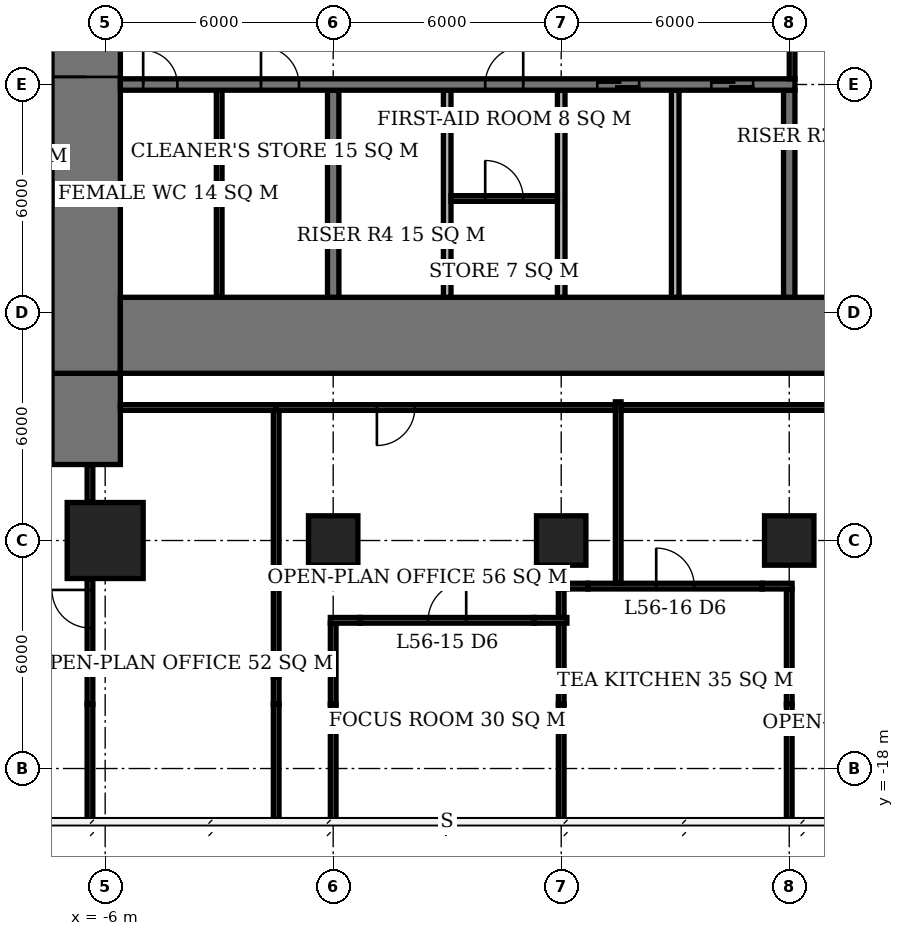
"""IFC4 building model, lengths in metres.
Left out: names, types, materials, properties, quantities, classifications, styles, units other than length and angle.
Written with IfcOpenShell. Run it as: python <this file> out.ifc"""

import sys

from ifc_helpers import new_model, si_unit, direction, frame, frame_2d, origin, origin_2d, place, context, subcontext, project, spatial, rectangle, extrude, element, fill, save


model = new_model("IFC4")
c1 = context("Model", 3, precision=1e-05, world=origin(), true_north=direction((0.0, 1.0)))
c2 = subcontext(c1, "Body", "Model", "MODEL_VIEW")
j1 = project(units=[si_unit("LENGTHUNIT", "METRE"), si_unit("PLANEANGLEUNIT", "RADIAN")], contexts=[c1])
p1 = place(None, origin())
s1 = spatial("IfcSite", under=j1, at=p1, CompositionType="ELEMENT")
p2 = place(p1, origin())
s2 = spatial("IfcBuilding", under=s1, at=p2, CompositionType="ELEMENT")
p3 = place(p2, frame((0.0, 0.0, 227.9)))
s3 = spatial("IfcBuildingStorey", under=s2, at=p3, CompositionType="ELEMENT", Elevation=227.9)
p4 = place(p3, frame((-6.0, -12.0, 0.0), z_axis=(0.0, 0.0, 1.0), x_axis=(1.0, 0.0, 0.0)))
e1 = element("IfcColumn", 1, at=p4, inside=s3, PredefinedType="COLUMN", context=c2, shape_type="SweptSolid", body=[
    extrude(rectangle(XDim=2.0, YDim=2.0, at=origin_2d()), origin(), (0.0, 0.0, 1.0), 3.9),
])
for number, where, z_axis, x_axis in (
    (2, (0.0, -12.0, 0.0), (0.0, 0.0, 1.0), (1.0, 0.0, 0.0)),
    (3, (6.0, -12.0, 0.0), (0.0, 0.0, 1.0), (1.0, 0.0, 0.0)),
    (4, (12.0, -12.0, 0.0), (0.0, 0.0, 1.0), (1.0, 0.0, 0.0)),
):
    element("IfcColumn", number, at=place(p3, frame(where, z_axis=z_axis, x_axis=x_axis)), inside=s3, PredefinedType="COLUMN", context=c2, shape_type="SweptSolid", body=[
        extrude(rectangle(XDim=1.3, YDim=1.3, at=origin_2d()), origin(), (0.0, 0.0, 1.0), 3.9),
    ])
p5 = place(p3, frame((-5.6, -6.6, 0.0), z_axis=(0.0, 0.0, 1.0), x_axis=(1.0, 0.0, 0.0)))
e5 = element("IfcWall", 5, at=p5, inside=s3, PredefinedType="SHEAR", context=c2, shape_type="SweptSolid", body=[
    extrude(rectangle(XDim=23.2, YDim=2.0, at=frame_2d((11.6, 0.0))), origin(), (0.0, 0.0, 1.0), 3.9),
])
p6 = place(p3, frame((-6.5, -7.6, 0.0), z_axis=(0.0, 0.0, 1.0), x_axis=(0.0, 1.0, 0.0)))
e6 = element("IfcWall", 6, at=p6, inside=s3, PredefinedType="SHEAR", context=c2, shape_type="SweptSolid", body=[
    extrude(rectangle(XDim=21.2, YDim=1.8, at=frame_2d((10.6, 0.0))), origin(), (0.0, 0.0, 1.0), 3.9),
])
p7 = place(p6, frame((7.8, 0.0, 0.0)))
e7 = element("IfcOpeningElement", 7, at=p7, cuts=e6, PredefinedType="OPENING", context=c2, shape_type="SweptSolid", body=[
    extrude(rectangle(XDim=1.8, YDim=2.4, at=frame_2d((0.9, 1.2))), frame((0.0, 0.91, 0.0), z_axis=(0.0, -1.0, 0.0), x_axis=(1.0, 0.0, 0.0)), (0.0, 0.0, 1.0), 1.82),
])
p8 = place(p3, frame((-6.5, -10.0, 0.0), z_axis=(0.0, 0.0, 1.0), x_axis=(0.0, 1.0, 0.0)))
e8 = element("IfcWall", 8, at=p8, inside=s3, PredefinedType="SHEAR", context=c2, shape_type="SweptSolid", body=[
    extrude(rectangle(XDim=2.4, YDim=1.8, at=frame_2d((1.2, 0.0))), origin(), (0.0, 0.0, 1.0), 3.9),
])
p9 = place(p3, frame((-5.6, 0.0, 0.0), z_axis=(0.0, 0.0, 1.0), x_axis=(1.0, 0.0, 0.0)))
e9 = element("IfcWall", 9, at=p9, inside=s3, PredefinedType="SHEAR", context=c2, shape_type="SweptSolid", body=[
    extrude(rectangle(XDim=17.75, YDim=0.3, at=frame_2d((8.875, 0.0))), origin(), (0.0, 0.0, 1.0), 3.9),
])
p10 = place(p9, frame((0.6, 0.0, 0.0)))
e10 = element("IfcOpeningElement", 10, at=p10, cuts=e9, PredefinedType="OPENING", context=c2, shape_type="SweptSolid", body=[
    extrude(rectangle(XDim=0.9, YDim=2.1, at=frame_2d((0.45, 1.05))), frame((0.0, 0.16, 0.0), z_axis=(0.0, -1.0, 0.0), x_axis=(1.0, 0.0, 0.0)), (0.0, 0.0, 1.0), 0.32),
])
p11 = place(p9, frame((3.7, 0.0, 0.0)))
e11 = element("IfcOpeningElement", 11, at=p11, cuts=e9, PredefinedType="OPENING", context=c2, shape_type="SweptSolid", body=[
    extrude(rectangle(XDim=1.0, YDim=2.1, at=frame_2d((0.5, 1.05))), frame((0.0, 0.16, 0.0), z_axis=(0.0, -1.0, 0.0), x_axis=(1.0, 0.0, 0.0)), (0.0, 0.0, 1.0), 0.32),
])
p12 = place(p9, frame((9.6, 0.0, 0.0)))
e12 = element("IfcOpeningElement", 12, at=p12, cuts=e9, PredefinedType="OPENING", context=c2, shape_type="SweptSolid", body=[
    extrude(rectangle(XDim=1.0, YDim=2.1, at=frame_2d((0.5, 1.05))), frame((0.0, 0.16, 0.0), z_axis=(0.0, -1.0, 0.0), x_axis=(1.0, 0.0, 0.0)), (0.0, 0.0, 1.0), 0.32),
])
p13 = place(p9, frame((12.55, 0.0, 0.0)))
e13 = element("IfcOpeningElement", 13, at=p13, cuts=e9, PredefinedType="OPENING", context=c2, shape_type="SweptSolid", body=[
    extrude(rectangle(XDim=1.1, YDim=2.1, at=frame_2d((0.55, 1.05))), frame((0.0, 0.16, 0.0), z_axis=(0.0, -1.0, 0.0), x_axis=(1.0, 0.0, 0.0)), (0.0, 0.0, 1.0), 0.32),
])
p14 = place(p9, frame((15.55, 0.0, 0.0)))
e14 = element("IfcOpeningElement", 14, at=p14, cuts=e9, PredefinedType="OPENING", context=c2, shape_type="SweptSolid", body=[
    extrude(rectangle(XDim=1.1, YDim=2.1, at=frame_2d((0.55, 1.05))), frame((0.0, 0.16, 0.0), z_axis=(0.0, -1.0, 0.0), x_axis=(1.0, 0.0, 0.0)), (0.0, 0.0, 1.0), 0.32),
])
for number, where, z_axis, x_axis in (
    (15, (0.0, -5.6, 0.0), (0.0, 0.0, 1.0), (0.0, 1.0, 0.0)),
    (16, (12.0, -5.6, 0.0), (0.0, 0.0, 1.0), (0.0, 1.0, 0.0)),
):
    element("IfcWall", number, at=place(p3, frame(where, z_axis=z_axis, x_axis=x_axis)), inside=s3, PredefinedType="SHEAR", context=c2, shape_type="SweptSolid", body=[
        extrude(rectangle(XDim=5.45, YDim=0.3, at=frame_2d((2.725, 0.0))), origin(), (0.0, 0.0, 1.0), 3.9),
    ])
for number, where, z_axis, x_axis in (
    (17, (3.0, -5.6, 0.0), (0.0, 0.0, 1.0), (0.0, 1.0, 0.0)),
    (18, (6.0, -5.6, 0.0), (0.0, 0.0, 1.0), (0.0, 1.0, 0.0)),
    (19, (9.0, -5.6, 0.0), (0.0, 0.0, 1.0), (0.0, 1.0, 0.0)),
):
    element("IfcWall", number, at=place(p3, frame(where, z_axis=z_axis, x_axis=x_axis)), inside=s3, PredefinedType="SOLIDWALL", context=c2, shape_type="SweptSolid", body=[
        extrude(rectangle(XDim=5.45, YDim=0.2, at=frame_2d((2.725, 0.0))), origin(), (0.0, 0.0, 1.0), 3.9),
    ])
p15 = place(p3, frame((-3.0, -5.6, 0.0), z_axis=(0.0, 0.0, 1.0), x_axis=(0.0, 1.0, 0.0)))
e20 = element("IfcWall", 20, at=p15, inside=s3, PredefinedType="PLUMBINGWALL", context=c2, shape_type="SweptSolid", body=[
    extrude(rectangle(XDim=5.45, YDim=0.15, at=frame_2d((2.725, 0.0))), origin(), (0.0, 0.0, 1.0), 3.65),
])
p16 = place(p3, frame((3.1, -3.0, 0.0), z_axis=(0.0, 0.0, 1.0), x_axis=(1.0, 0.0, 0.0)))
e21 = element("IfcWall", 21, at=p16, inside=s3, PredefinedType="PARTITIONING", context=c2, shape_type="SweptSolid", body=[
    extrude(rectangle(XDim=2.8, YDim=0.15, at=frame_2d((1.4, 0.0))), origin(), (0.0, 0.0, 1.0), 3.65),
])
p17 = place(p16, frame((0.9, 0.0, 0.0)))
e22 = element("IfcOpeningElement", 22, at=p17, cuts=e21, PredefinedType="OPENING", context=c2, shape_type="SweptSolid", body=[
    extrude(rectangle(XDim=1.0, YDim=2.1, at=frame_2d((0.5, 1.05))), frame((0.0, 0.085, 0.0), z_axis=(0.0, -1.0, 0.0), x_axis=(1.0, 0.0, 0.0)), (0.0, 0.0, 1.0), 0.17),
])
p18 = place(p3, frame((-0.075, -14.1, 0.0), z_axis=(0.0, 0.0, 1.0), x_axis=(1.0, 0.0, 0.0)))
e23 = element("IfcWall", 23, at=p18, inside=s3, PredefinedType="PARTITIONING", context=c2, shape_type="SweptSolid", body=[
    extrude(rectangle(XDim=0.785, YDim=0.15, at=frame_2d((0.393, 0.0))), origin(), (0.0, 0.0, 1.0), 2.65),
])
p19 = place(p3, frame((0.71, -14.1, 0.0), z_axis=(0.0, 0.0, 1.0), x_axis=(1.0, 0.0, 0.0)))
e24 = element("IfcWall", 24, at=p19, inside=s3, PredefinedType="PARTITIONING", context=c2, shape_type="SweptSolid", body=[
    extrude(rectangle(XDim=4.58, YDim=0.15, at=frame_2d((2.29, 0.0))), origin(), (0.0, 0.0, 1.0), 3.65),
])
p20 = place(p19, frame((1.79, 0.0, 0.0)))
e25 = element("IfcOpeningElement", 25, at=p20, cuts=e24, PredefinedType="OPENING", context=c2, shape_type="SweptSolid", body=[
    extrude(rectangle(XDim=1.0, YDim=2.1, at=frame_2d((0.5, 1.05))), frame((0.0, 0.085, 0.0), z_axis=(0.0, -1.0, 0.0), x_axis=(1.0, 0.0, 0.0)), (0.0, 0.0, 1.0), 0.17),
])
p21 = place(p3, frame((5.29, -14.1, 0.0), z_axis=(0.0, 0.0, 1.0), x_axis=(1.0, 0.0, 0.0)))
e26 = element("IfcWall", 26, at=p21, inside=s3, PredefinedType="PARTITIONING", context=c2, shape_type="SweptSolid", body=[
    extrude(rectangle(XDim=0.86, YDim=0.15, at=frame_2d((0.43, 0.0))), origin(), (0.0, 0.0, 1.0), 2.65),
])
p22 = place(p3, frame((5.925, -13.2, 0.0), z_axis=(0.0, 0.0, 1.0), x_axis=(1.0, 0.0, 0.0)))
e27 = element("IfcWall", 27, at=p22, inside=s3, PredefinedType="PARTITIONING", context=c2, shape_type="SweptSolid", body=[
    extrude(rectangle(XDim=0.785, YDim=0.15, at=frame_2d((0.393, 0.0))), origin(), (0.0, 0.0, 1.0), 2.65),
])
p23 = place(p3, frame((6.71, -13.2, 0.0), z_axis=(0.0, 0.0, 1.0), x_axis=(1.0, 0.0, 0.0)))
e28 = element("IfcWall", 28, at=p23, inside=s3, PredefinedType="PARTITIONING", context=c2, shape_type="SweptSolid", body=[
    extrude(rectangle(XDim=4.58, YDim=0.15, at=frame_2d((2.29, 0.0))), origin(), (0.0, 0.0, 1.0), 3.65),
])
p24 = place(p23, frame((1.79, 0.0, 0.0)))
e29 = element("IfcOpeningElement", 29, at=p24, cuts=e28, PredefinedType="OPENING", context=c2, shape_type="SweptSolid", body=[
    extrude(rectangle(XDim=1.0, YDim=2.1, at=frame_2d((0.5, 1.05))), frame((0.0, 0.085, 0.0), z_axis=(0.0, -1.0, 0.0), x_axis=(1.0, 0.0, 0.0)), (0.0, 0.0, 1.0), 0.17),
])
p25 = place(p3, frame((11.29, -13.2, 0.0), z_axis=(0.0, 0.0, 1.0), x_axis=(1.0, 0.0, 0.0)))
e30 = element("IfcWall", 30, at=p25, inside=s3, PredefinedType="PARTITIONING", context=c2, shape_type="SweptSolid", body=[
    extrude(rectangle(XDim=0.785, YDim=0.15, at=frame_2d((0.393, 0.0))), origin(), (0.0, 0.0, 1.0), 2.65),
])
p26 = place(p3, frame((0.0, -19.35, 0.0), z_axis=(0.0, 0.0, 1.0), x_axis=(0.0, 1.0, 0.0)))
e31 = element("IfcWall", 31, at=p26, inside=s3, PredefinedType="PARTITIONING", context=c2, shape_type="SweptSolid", body=[
    extrude(rectangle(XDim=3.04, YDim=0.15, at=frame_2d((1.52, 0.0))), origin(), (0.0, 0.0, 1.0), 3.65),
])
p27 = place(p3, frame((0.0, -16.31, 0.0), z_axis=(0.0, 0.0, 1.0), x_axis=(0.0, 1.0, 0.0)))
e32 = element("IfcWall", 32, at=p27, inside=s3, PredefinedType="PARTITIONING", context=c2, shape_type="SweptSolid", body=[
    extrude(rectangle(XDim=2.135, YDim=0.15, at=frame_2d((1.067, 0.0))), origin(), (0.0, 0.0, 1.0), 2.65),
])
p28 = place(p3, frame((6.0, -19.35, 0.0), z_axis=(0.0, 0.0, 1.0), x_axis=(0.0, 1.0, 0.0)))
e33 = element("IfcWall", 33, at=p28, inside=s3, PredefinedType="PARTITIONING", context=c2, shape_type="SweptSolid", body=[
    extrude(rectangle(XDim=3.04, YDim=0.15, at=frame_2d((1.52, 0.0))), origin(), (0.0, 0.0, 1.0), 3.65),
])
p29 = place(p3, frame((6.0, -16.31, 0.0), z_axis=(0.0, 0.0, 1.0), x_axis=(0.0, 1.0, 0.0)))
e34 = element("IfcWall", 34, at=p29, inside=s3, PredefinedType="PARTITIONING", context=c2, shape_type="SweptSolid", body=[
    extrude(rectangle(XDim=2.135, YDim=0.15, at=frame_2d((1.067, 0.0))), origin(), (0.0, 0.0, 1.0), 2.65),
])
p30 = place(p3, frame((6.0, -14.025, 0.0), z_axis=(0.0, 0.0, 1.0), x_axis=(0.0, 1.0, 0.0)))
e35 = element("IfcWall", 35, at=p30, inside=s3, PredefinedType="PARTITIONING", context=c2, shape_type="SweptSolid", body=[
    extrude(rectangle(XDim=0.75, YDim=0.15, at=frame_2d((0.375, 0.0))), origin(), (0.0, 0.0, 1.0), 2.65),
])
p31 = place(p3, frame((12.0, -19.4, 0.0), z_axis=(0.0, 0.0, 1.0), x_axis=(0.0, 1.0, 0.0)))
e36 = element("IfcWall", 36, at=p31, inside=s3, PredefinedType="PARTITIONING", context=c2, shape_type="SweptSolid", body=[
    extrude(rectangle(XDim=3.09, YDim=0.15, at=frame_2d((1.545, 0.0))), origin(), (0.0, 0.0, 1.0), 3.65),
])
p32 = place(p3, frame((12.0, -16.31, 0.0), z_axis=(0.0, 0.0, 1.0), x_axis=(0.0, 1.0, 0.0)))
e37 = element("IfcWall", 37, at=p32, inside=s3, PredefinedType="PARTITIONING", context=c2, shape_type="SweptSolid", body=[
    extrude(rectangle(XDim=3.035, YDim=0.15, at=frame_2d((1.518, 0.0))), origin(), (0.0, 0.0, 1.0), 2.65),
])
p33 = place(p3, frame((-6.4, -19.35, 0.0), z_axis=(0.0, 0.0, 1.0), x_axis=(0.0, 1.0, 0.0)))
e38 = element("IfcWall", 38, at=p33, inside=s3, PredefinedType="PARTITIONING", context=c2, shape_type="SweptSolid", body=[
    extrude(rectangle(XDim=3.04, YDim=0.15, at=frame_2d((1.52, 0.0))), origin(), (0.0, 0.0, 1.0), 3.65),
])
p34 = place(p3, frame((-6.4, -16.31, 0.0), z_axis=(0.0, 0.0, 1.0), x_axis=(0.0, 1.0, 0.0)))
e39 = element("IfcWall", 39, at=p34, inside=s3, PredefinedType="PARTITIONING", context=c2, shape_type="SweptSolid", body=[
    extrude(rectangle(XDim=3.31, YDim=0.15, at=frame_2d((1.655, 0.0))), origin(), (0.0, 0.0, 1.0), 2.65),
])
p35 = place(p34, frame((2.01, 0.0, 0.0)))
e40 = element("IfcOpeningElement", 40, at=p35, cuts=e39, PredefinedType="OPENING", context=c2, shape_type="SweptSolid", body=[
    extrude(rectangle(XDim=1.0, YDim=2.1, at=frame_2d((0.5, 1.05))), frame((0.0, 0.085, 0.0), z_axis=(0.0, -1.0, 0.0), x_axis=(1.0, 0.0, 0.0)), (0.0, 0.0, 1.0), 0.17),
])
p36 = place(p3, frame((-6.4, -11.0, 0.0), z_axis=(0.0, 0.0, 1.0), x_axis=(0.0, 1.0, 0.0)))
e41 = element("IfcWall", 41, at=p36, inside=s3, PredefinedType="PARTITIONING", context=c2, shape_type="SweptSolid", body=[
    extrude(rectangle(XDim=1.0, YDim=0.15, at=frame_2d((0.5, 0.0))), origin(), (0.0, 0.0, 1.0), 3.65),
])
p37 = place(p3, frame((-5.6, -8.5, 0.0), z_axis=(0.0, 0.0, 1.0), x_axis=(1.0, 0.0, 0.0)))
e42 = element("IfcWall", 42, at=p37, inside=s3, PredefinedType="PARTITIONING", context=c2, shape_type="SweptSolid", body=[
    extrude(rectangle(XDim=4.1, YDim=0.15, at=frame_2d((2.05, 0.0))), origin(), (0.0, 0.0, 1.0), 3.65),
])
p38 = place(p3, frame((-1.5, -19.4, 0.0), z_axis=(0.0, 0.0, 1.0), x_axis=(0.0, 1.0, 0.0)))
e43 = element("IfcWall", 43, at=p38, inside=s3, PredefinedType="PARTITIONING", context=c2, shape_type="SweptSolid", body=[
    extrude(rectangle(XDim=3.09, YDim=0.15, at=frame_2d((1.545, 0.0))), origin(), (0.0, 0.0, 1.0), 3.65),
])
p39 = place(p3, frame((-1.5, -16.31, 0.0), z_axis=(0.0, 0.0, 1.0), x_axis=(0.0, 1.0, 0.0)))
e44 = element("IfcWall", 44, at=p39, inside=s3, PredefinedType="PARTITIONING", context=c2, shape_type="SweptSolid", body=[
    extrude(rectangle(XDim=0.72, YDim=0.15, at=frame_2d((0.36, 0.0))), origin(), (0.0, 0.0, 1.0), 2.65),
])
p40 = place(p3, frame((-1.5, -15.59, 0.0), z_axis=(0.0, 0.0, 1.0), x_axis=(0.0, 1.0, 0.0)))
e45 = element("IfcWall", 45, at=p40, inside=s3, PredefinedType="PARTITIONING", context=c2, shape_type="SweptSolid", body=[
    extrude(rectangle(XDim=7.015, YDim=0.15, at=frame_2d((3.508, 0.0))), origin(), (0.0, 0.0, 1.0), 3.65),
])
p41 = place(p3, frame((7.425, -8.5, 0.0), z_axis=(0.0, 0.0, 1.0), x_axis=(-1.0, 0.0, 0.0)))
e46 = element("IfcWall", 46, at=p41, inside=s3, PredefinedType="PARTITIONING", context=c2, shape_type="SweptSolid", body=[
    extrude(rectangle(XDim=8.925, YDim=0.15, at=frame_2d((4.462, 0.0))), origin(), (0.0, 0.0, 1.0), 3.65),
])
p42 = place(p41, frame((5.275, 0.0, 0.0)))
e47 = element("IfcOpeningElement", 47, at=p42, cuts=e46, PredefinedType="OPENING", context=c2, shape_type="SweptSolid", body=[
    extrude(rectangle(XDim=1.0, YDim=2.1, at=frame_2d((0.5, 1.05))), frame((0.0, 0.085, 0.0), z_axis=(0.0, -1.0, 0.0), x_axis=(1.0, 0.0, 0.0)), (0.0, 0.0, 1.0), 0.17),
])
p43 = place(p3, frame((7.5, -13.125, 0.0), z_axis=(0.0, 0.0, 1.0), x_axis=(0.0, 1.0, 0.0)))
e48 = element("IfcWall", 48, at=p43, inside=s3, PredefinedType="PARTITIONING", context=c2, shape_type="SweptSolid", body=[
    extrude(rectangle(XDim=4.775, YDim=0.15, at=frame_2d((2.387, 0.0))), origin(), (0.0, 0.0, 1.0), 3.65),
])
p44 = place(p3, frame((7.575, -8.5, 0.0), z_axis=(0.0, 0.0, 1.0), x_axis=(1.0, 0.0, 0.0)))
e49 = element("IfcWall", 49, at=p44, inside=s3, PredefinedType="PARTITIONING", context=c2, shape_type="SweptSolid", body=[
    extrude(rectangle(XDim=10.025, YDim=0.15, at=frame_2d((5.013, 0.0))), origin(), (0.0, 0.0, 1.0), 3.65),
])
p45 = place(p3, frame((12.075, 0.15, 0.0), z_axis=(0.0, 0.0, 1.0), x_axis=(0.0, 1.0, 0.0)))
e50 = element("IfcWall", 50, at=p45, inside=s3, PredefinedType="PARTITIONING", context=c2, shape_type="SweptSolid", body=[
    extrude(rectangle(XDim=3.0, YDim=0.15, at=frame_2d((1.5, 0.0))), origin(), (0.0, 0.0, 1.0), 3.65),
])
p46 = place(p7, origin())
e51 = element("IfcDoor", 51, at=p46, inside=s3, OperationType="DOUBLE_DOOR_SINGLE_SWING", PredefinedType="DOOR", context=c2, shape_type="SweptSolid", body=[
    extrude(rectangle(XDim=1.8, YDim=2.4, at=frame_2d((0.9, 1.2))), frame((0.0, 0.025, 0.0), z_axis=(0.0, -1.0, 0.0), x_axis=(1.0, 0.0, 0.0)), (0.0, 0.0, 1.0), 0.05),
])
fill(e7, e51)
p47 = place(p10, origin())
e52 = element("IfcDoor", 52, at=p47, inside=s3, OperationType="SINGLE_SWING_LEFT", PredefinedType="DOOR", context=c2, shape_type="SweptSolid", body=[
    extrude(rectangle(XDim=0.9, YDim=2.1, at=frame_2d((0.45, 1.05))), frame((0.0, 0.025, 0.0), z_axis=(0.0, -1.0, 0.0), x_axis=(1.0, 0.0, 0.0)), (0.0, 0.0, 1.0), 0.05),
])
fill(e10, e52)
p48 = place(p11, origin())
e53 = element("IfcDoor", 53, at=p48, inside=s3, OperationType="SINGLE_SWING_LEFT", PredefinedType="DOOR", context=c2, shape_type="SweptSolid", body=[
    extrude(rectangle(XDim=1.0, YDim=2.1, at=frame_2d((0.5, 1.05))), frame((0.0, 0.025, 0.0), z_axis=(0.0, -1.0, 0.0), x_axis=(1.0, 0.0, 0.0)), (0.0, 0.0, 1.0), 0.05),
])
fill(e11, e53)
p49 = place(p17, origin())
e54 = element("IfcDoor", 54, at=p49, inside=s3, OperationType="SINGLE_SWING_LEFT", PredefinedType="DOOR", context=c2, shape_type="SweptSolid", body=[
    extrude(rectangle(XDim=1.0, YDim=2.1, at=frame_2d((0.5, 1.05))), frame((0.0, 0.025, 0.0), z_axis=(0.0, -1.0, 0.0), x_axis=(1.0, 0.0, 0.0)), (0.0, 0.0, 1.0), 0.05),
])
fill(e22, e54)
p50 = place(p12, origin())
e55 = element("IfcDoor", 55, at=p50, inside=s3, OperationType="SINGLE_SWING_RIGHT", PredefinedType="DOOR", context=c2, shape_type="SweptSolid", body=[
    extrude(rectangle(XDim=1.0, YDim=2.1, at=frame_2d((0.5, 1.05))), frame((0.0, 0.025, 0.0), z_axis=(0.0, -1.0, 0.0), x_axis=(1.0, 0.0, 0.0)), (0.0, 0.0, 1.0), 0.05),
])
fill(e12, e55)
p51 = place(p13, origin())
e56 = element("IfcDoor", 56, at=p51, inside=s3, OperationType="DOUBLE_DOOR_SLIDING", PredefinedType="USERDEFINED", context=c2, shape_type="SweptSolid", body=[
    extrude(rectangle(XDim=1.1, YDim=2.1, at=frame_2d((0.55, 1.05))), frame((0.0, 0.025, 0.0), z_axis=(0.0, -1.0, 0.0), x_axis=(1.0, 0.0, 0.0)), (0.0, 0.0, 1.0), 0.05),
])
fill(e13, e56)
p52 = place(p14, origin())
e57 = element("IfcDoor", 57, at=p52, inside=s3, OperationType="DOUBLE_DOOR_SLIDING", PredefinedType="USERDEFINED", context=c2, shape_type="SweptSolid", body=[
    extrude(rectangle(XDim=1.1, YDim=2.1, at=frame_2d((0.55, 1.05))), frame((0.0, 0.025, 0.0), z_axis=(0.0, -1.0, 0.0), x_axis=(1.0, 0.0, 0.0)), (0.0, 0.0, 1.0), 0.05),
])
fill(e14, e57)
p53 = place(p20, origin())
e58 = element("IfcDoor", 58, at=p53, inside=s3, OperationType="SINGLE_SWING_RIGHT", PredefinedType="DOOR", context=c2, shape_type="SweptSolid", body=[
    extrude(rectangle(XDim=1.0, YDim=2.1, at=frame_2d((0.5, 1.05))), frame((0.0, 0.025, 0.0), z_axis=(0.0, -1.0, 0.0), x_axis=(1.0, 0.0, 0.0)), (0.0, 0.0, 1.0), 0.05),
])
fill(e25, e58)
p54 = place(p24, origin())
e59 = element("IfcDoor", 59, at=p54, inside=s3, OperationType="SINGLE_SWING_LEFT", PredefinedType="DOOR", context=c2, shape_type="SweptSolid", body=[
    extrude(rectangle(XDim=1.0, YDim=2.1, at=frame_2d((0.5, 1.05))), frame((0.0, 0.025, 0.0), z_axis=(0.0, -1.0, 0.0), x_axis=(1.0, 0.0, 0.0)), (0.0, 0.0, 1.0), 0.05),
])
fill(e29, e59)
p55 = place(p35, origin())
e60 = element("IfcDoor", 60, at=p55, inside=s3, OperationType="SINGLE_SWING_RIGHT", PredefinedType="DOOR", context=c2, shape_type="SweptSolid", body=[
    extrude(rectangle(XDim=1.0, YDim=2.1, at=frame_2d((0.5, 1.05))), frame((0.0, 0.025, 0.0), z_axis=(0.0, -1.0, 0.0), x_axis=(1.0, 0.0, 0.0)), (0.0, 0.0, 1.0), 0.05),
])
fill(e40, e60)
p56 = place(p42, origin())
e61 = element("IfcDoor", 61, at=p56, inside=s3, OperationType="SINGLE_SWING_RIGHT", PredefinedType="DOOR", context=c2, shape_type="SweptSolid", body=[
    extrude(rectangle(XDim=1.0, YDim=2.1, at=frame_2d((0.5, 1.05))), frame((0.0, 0.025, 0.0), z_axis=(0.0, -1.0, 0.0), x_axis=(1.0, 0.0, 0.0)), (0.0, 0.0, 1.0), 0.05),
])
fill(e47, e61)
save(model, sys.argv[1])
